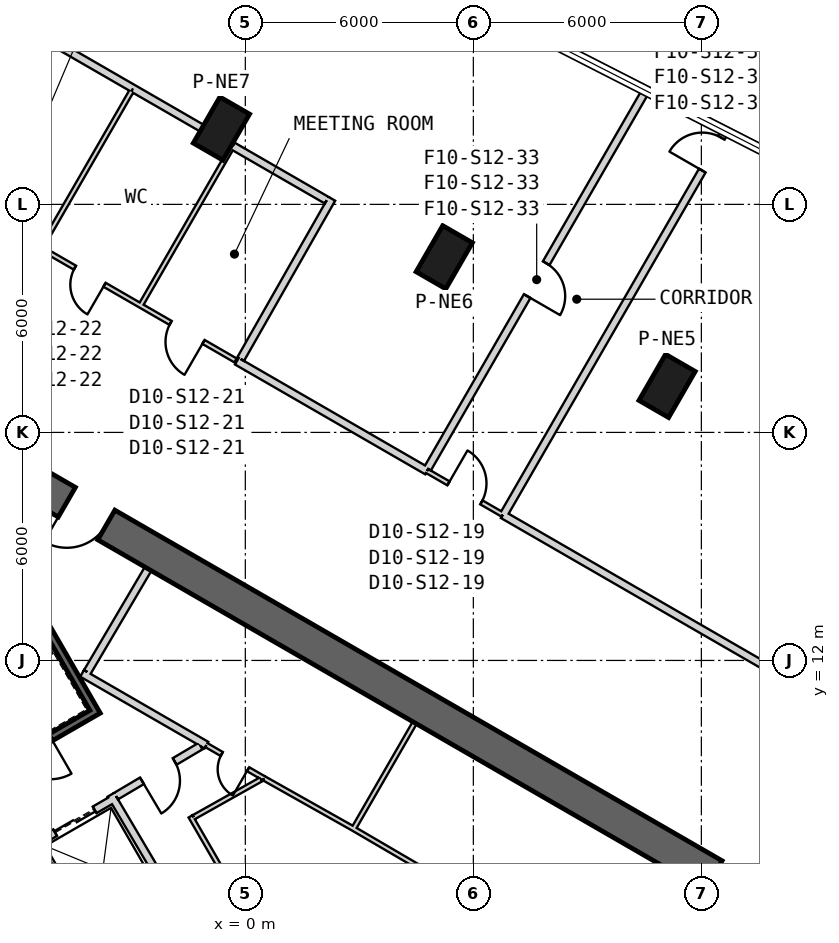
"""IFC4 building model, lengths in metres.
Left out: names, types, materials, properties, quantities, classifications, styles, units other than length and angle.
Written with IfcOpenShell. Run it as: python <this file> out.ifc"""

import sys

from ifc_helpers import new_model, si_unit, direction, frame, frame_2d, origin, origin_2d, place, context, subcontext, project, spatial, rectangle, extrude, element, fill, save


model = new_model("IFC4")
c1 = context("Model", 3, precision=1e-05, world=origin(), true_north=direction((0.0, 1.0)))
c2 = subcontext(c1, "Body", "Model", "MODEL_VIEW")
j1 = project(units=[si_unit("LENGTHUNIT", "METRE"), si_unit("PLANEANGLEUNIT", "RADIAN")], contexts=[c1])
p1 = place(None, origin())
s1 = spatial("IfcSite", under=j1, at=p1, CompositionType="ELEMENT")
p2 = place(p1, origin())
s2 = spatial("IfcBuilding", under=s1, at=p2, CompositionType="ELEMENT")
p3 = place(p2, frame((0.0, 0.0, 205.2)))
s3 = spatial("IfcBuildingStorey", under=s2, at=p3, CompositionType="ELEMENT", Elevation=205.2)
for number, where, z_axis, x_axis in (
    (1, (11.098, 19.223, 0.0), (0.0, 0.0, 1.0), (0.5, 0.866, 0.0)),
    (2, (5.235, 22.609, 0.0), (0.0, 0.0, 1.0), (0.5, 0.866, 0.0)),
    (3, (-0.629, 25.994, 0.0), (0.0, 0.0, 1.0), (0.5, 0.866, 0.0)),
):
    element("IfcColumn", number, at=place(p3, frame(where, z_axis=z_axis, x_axis=x_axis)), inside=s3, PredefinedType="COLUMN", context=c2, shape_type="SweptSolid", body=[
        extrude(rectangle(XDim=1.4, YDim=0.9, at=origin_2d()), origin(), (0.0, 0.0, 1.0), 4.0),
    ])
p4 = place(p3, frame((19.475, 2.208, 0.0), z_axis=(0.0, 0.0, 1.0), x_axis=(-0.866028369851, 0.499994862586, 0.0)))
e4 = element("IfcWall", 4, at=p4, inside=s3, PredefinedType="SHEAR", context=c2, shape_type="SweptSolid", body=[
    extrude(rectangle(XDim=31.523, YDim=0.9, at=frame_2d((15.762, 0.0))), origin(), (0.0, 0.0, 1.0), 4.0),
])
p5 = place(p4, frame((7.062, 0.0, 0.0)))
e5 = element("IfcOpeningElement", 5, at=p5, cuts=e4, PredefinedType="OPENING", context=c2, shape_type="SweptSolid", body=[
    extrude(rectangle(XDim=1.2, YDim=2.4, at=frame_2d((0.6, 1.2))), frame((0.0, 0.46, 0.0), z_axis=(0.0, -1.0, 0.0), x_axis=(1.0, 0.0, 0.0)), (0.0, 0.0, 1.0), 0.92),
])
p6 = place(p4, frame((3.612, 0.0, 0.0)))
e6 = element("IfcOpeningElement", 6, at=p6, cuts=e4, PredefinedType="OPENING", context=c2, shape_type="SweptSolid", body=[
    extrude(rectangle(XDim=1.2, YDim=2.4, at=frame_2d((0.6, 1.2))), frame((0.0, 0.46, 0.0), z_axis=(0.0, -1.0, 0.0), x_axis=(1.0, 0.0, 0.0)), (0.0, 0.0, 1.0), 0.92),
])
p7 = place(p4, frame((26.712, 0.0, 0.0)))
e7 = element("IfcOpeningElement", 7, at=p7, cuts=e4, PredefinedType="OPENING", context=c2, shape_type="SweptSolid", body=[
    extrude(rectangle(XDim=1.2, YDim=2.4, at=frame_2d((0.6, 1.2))), frame((0.0, 0.46, 0.0), z_axis=(0.0, -1.0, 0.0), x_axis=(1.0, 0.0, 0.0)), (0.0, 0.0, 1.0), 0.92),
])
p8 = place(p3, frame((-7.854, 17.405, -0.3), z_axis=(0.0, 0.0, 1.0), x_axis=(0.499997992926, -0.866026562566, 0.0)))
e8 = element("IfcWall", 8, at=p8, inside=s3, PredefinedType="SHEAR", context=c2, shape_type="SweptSolid", body=[
    extrude(rectangle(XDim=7.9, YDim=0.2, at=frame_2d((3.95, 0.0))), origin(), (0.0, 0.0, 1.0), 4.0),
])
p9 = place(p3, frame((-7.159, 8.8, -0.3), z_axis=(0.0, 0.0, 1.0), x_axis=(0.866047807691, 0.499961193289, 0.0)))
e9 = element("IfcWall", 9, at=p9, inside=s3, PredefinedType="SHEAR", context=c2, shape_type="SweptSolid", body=[
    extrude(rectangle(XDim=3.6, YDim=0.2, at=frame_2d((1.8, 0.0))), origin(), (0.0, 0.0, 1.0), 4.0),
])
p10 = place(p9, frame((1.25, 0.0, 0.3)))
e10 = element("IfcOpeningElement", 10, at=p10, cuts=e9, PredefinedType="OPENING", context=c2, shape_type="SweptSolid", body=[
    extrude(rectangle(XDim=1.1, YDim=2.1, at=frame_2d((0.55, 1.05))), frame((0.0, 0.11, 0.0), z_axis=(0.0, -1.0, 0.0), x_axis=(1.0, 0.0, 0.0)), (0.0, 0.0, 1.0), 0.22),
])
p11 = place(p3, frame((-5.524, 7.168, 0.0), z_axis=(0.0, 0.0, 1.0), x_axis=(0.866024647952, 0.500001309137, 0.0)))
e11 = element("IfcWall", 11, at=p11, inside=s3, PredefinedType="PLUMBINGWALL", context=c2, shape_type="SweptSolid", body=[
    extrude(rectangle(XDim=2.4, YDim=0.2, at=frame_2d((1.2, 0.0))), origin(), (0.0, 0.0, 1.0), 3.7),
])
p12 = place(p11, frame((0.6, 0.0, 0.0)))
e12 = element("IfcOpeningElement", 12, at=p12, cuts=e11, PredefinedType="OPENING", context=c2, shape_type="SweptSolid", body=[
    extrude(rectangle(XDim=1.2, YDim=2.4, at=frame_2d((0.6, 1.2))), frame((0.0, 0.11, 0.0), z_axis=(0.0, -1.0, 0.0), x_axis=(1.0, 0.0, 0.0)), (0.0, 0.0, 1.0), 0.22),
])
p13 = place(p3, frame((-4.039, 4.596, 0.0), z_axis=(0.0, 0.0, 1.0), x_axis=(-0.491322718731, 0.870977603649, 0.0)))
e13 = element("IfcWall", 13, at=p13, inside=s3, PredefinedType="PLUMBINGWALL", context=c2, shape_type="SweptSolid", body=[
    extrude(rectangle(XDim=3.1, YDim=0.2, at=frame_2d((1.55, 0.0))), origin(), (0.0, 0.0, 1.0), 3.7),
])
p14 = place(p3, frame((-3.538, 8.465, 0.0), z_axis=(0.0, 0.0, 1.0), x_axis=(0.508616218331, -0.860993346345, 0.0)))
e14 = element("IfcWall", 14, at=p14, inside=s3, PredefinedType="PLUMBINGWALL", context=c2, shape_type="SweptSolid", body=[
    extrude(rectangle(XDim=3.2, YDim=0.2, at=frame_2d((1.6, 0.0))), origin(), (0.0, 0.0, 1.0), 3.7),
])
p15 = place(p3, frame((4.457, 10.359, 0.0), z_axis=(0.0, 0.0, 1.0), x_axis=(-0.500017246033, -0.866015446554, 0.0)))
e15 = element("IfcWall", 15, at=p15, inside=s3, PredefinedType="PARTITIONING", context=c2, shape_type="SweptSolid", body=[
    extrude(rectangle(XDim=3.25, YDim=0.12, at=frame_2d((1.625, 0.0))), origin(), (0.0, 0.0, 1.0), 3.7),
])
p16 = place(p3, frame((7.457, 4.875, 0.0), z_axis=(0.0, 0.0, 1.0), x_axis=(-0.863262357411, 0.504755487615, 0.0)))
e16 = element("IfcWall", 16, at=p16, inside=s3, PredefinedType="PARTITIONING", context=c2, shape_type="SweptSolid", body=[
    extrude(rectangle(XDim=5.37, YDim=0.12, at=frame_2d((2.685, 0.0))), origin(), (0.0, 0.0, 1.0), 3.7),
])
p17 = place(p3, frame((-1.024, 9.771, 0.0), z_axis=(0.0, 0.0, 1.0), x_axis=(0.866039397417, -0.499975761534, 0.0)))
e17 = element("IfcWall", 17, at=p17, inside=s3, PredefinedType="PARTITIONING", context=c2, shape_type="SweptSolid", body=[
    extrude(rectangle(XDim=1.752, YDim=0.12, at=frame_2d((0.876, 0.0))), origin(), (0.0, 0.0, 1.0), 3.7),
])
p18 = place(p17, frame((0.466, 0.0, 0.0)))
e18 = element("IfcOpeningElement", 18, at=p18, cuts=e17, PredefinedType="OPENING", context=c2, shape_type="SweptSolid", body=[
    extrude(rectangle(XDim=0.8, YDim=2.1, at=frame_2d((0.4, 1.05))), frame((0.0, 0.07, 0.0), z_axis=(0.0, -1.0, 0.0), x_axis=(1.0, 0.0, 0.0)), (0.0, 0.0, 1.0), 0.14),
])
p19 = place(p3, frame((-4.296, 11.66, 0.0), z_axis=(0.0, 0.0, 1.0), x_axis=(0.866027389382, -0.499996560828, 0.0)))
e19 = element("IfcWall", 19, at=p19, inside=s3, PredefinedType="PARTITIONING", context=c2, shape_type="SweptSolid", body=[
    extrude(rectangle(XDim=3.778, YDim=0.2, at=frame_2d((1.889, 0.0))), origin(), (0.0, 0.0, 1.0), 3.7),
])
p20 = place(p3, frame((-2.558, 14.409, 0.0), z_axis=(0.0, 0.0, 1.0), x_axis=(-0.508018930956, -0.861345903683, 0.0)))
e20 = element("IfcWall", 20, at=p20, inside=s3, PredefinedType="PARTITIONING", context=c2, shape_type="SweptSolid", body=[
    extrude(rectangle(XDim=3.15, YDim=0.2, at=frame_2d((1.575, 0.0))), origin(), (0.0, 0.0, 1.0), 3.7),
])
p21 = place(p3, frame((2.821, 7.586, 0.0), z_axis=(0.0, 0.0, 1.0), x_axis=(-0.871426548871, 0.490526013503, 0.0)))
e21 = element("IfcWall", 21, at=p21, inside=s3, PredefinedType="PARTITIONING", context=c2, shape_type="SweptSolid", body=[
    extrude(rectangle(XDim=2.67, YDim=0.12, at=frame_2d((1.335, 0.0))), origin(), (0.0, 0.0, 1.0), 3.7),
])
p22 = place(p3, frame((-1.179, 9.745, 0.0), z_axis=(0.0, 0.0, 1.0), x_axis=(-0.860630814782, -0.509229418482, 0.0)))
e22 = element("IfcWall", 22, at=p22, inside=s3, PredefinedType="PARTITIONING", context=c2, shape_type="SweptSolid", body=[
    extrude(rectangle(XDim=2.582, YDim=0.2, at=frame_2d((1.291, 0.0))), origin(), (0.0, 0.0, 1.0), 3.7),
])
p23 = place(p22, frame((0.791, 0.0, 0.0)))
e23 = element("IfcOpeningElement", 23, at=p23, cuts=e22, PredefinedType="OPENING", context=c2, shape_type="SweptSolid", body=[
    extrude(rectangle(XDim=1.0, YDim=2.1, at=frame_2d((0.5, 1.05))), frame((0.0, 0.11, 0.0), z_axis=(0.0, -1.0, 0.0), x_axis=(1.0, 0.0, 0.0)), (0.0, 0.0, 1.0), 0.22),
])
p24 = place(p3, frame((-1.442, 7.897, 0.0), z_axis=(0.0, 0.0, 1.0), x_axis=(0.499990139034, -0.866031096941, 0.0)))
e24 = element("IfcWall", 24, at=p24, inside=s3, PredefinedType="PARTITIONING", context=c2, shape_type="SweptSolid", body=[
    extrude(rectangle(XDim=3.0, YDim=0.12, at=frame_2d((1.5, 0.0))), origin(), (0.0, 0.0, 1.0), 3.7),
])
p25 = place(p3, frame((0.414, 8.871, 0.0), z_axis=(0.0, 0.0, 1.0), x_axis=(-0.871809386997, -0.48984527429, 0.0)))
e25 = element("IfcWall", 25, at=p25, inside=s3, PredefinedType="PARTITIONING", context=c2, shape_type="SweptSolid", body=[
    extrude(rectangle(XDim=2.034, YDim=0.12, at=frame_2d((1.017, 0.0))), origin(), (0.0, 0.0, 1.0), 3.7),
])
p26 = place(p3, frame((4.783, 16.984, 0.0), z_axis=(0.0, 0.0, 1.0), x_axis=(0.866007057882, -0.500031774688, 0.0)))
e26 = element("IfcWall", 26, at=p26, inside=s3, PredefinedType="PARTITIONING", context=c2, shape_type="SweptSolid", body=[
    extrude(rectangle(XDim=2.3, YDim=0.12, at=frame_2d((1.15, 0.0))), origin(), (0.0, 0.0, 1.0), 3.7),
])
p27 = place(p26, frame((0.65, 0.0, 0.0)))
e27 = element("IfcOpeningElement", 27, at=p27, cuts=e26, PredefinedType="OPENING", context=c2, shape_type="SweptSolid", body=[
    extrude(rectangle(XDim=1.0, YDim=2.1, at=frame_2d((0.5, 1.05))), frame((0.0, 0.07, 0.0), z_axis=(0.0, -1.0, 0.0), x_axis=(1.0, 0.0, 0.0)), (0.0, 0.0, 1.0), 0.14),
])
p28 = place(p3, frame((23.119, 6.398, 0.0), z_axis=(0.0, 0.0, 1.0), x_axis=(-0.866027034507, 0.499997175495, 0.0)))
e28 = element("IfcWall", 28, at=p28, inside=s3, PredefinedType="PARTITIONING", context=c2, shape_type="SweptSolid", body=[
    extrude(rectangle(XDim=18.873, YDim=0.2, at=frame_2d((9.436, 0.0))), origin(), (0.0, 0.0, 1.0), 2.88),
])
p29 = place(p3, frame((4.783, 16.984, 0.0), z_axis=(0.0, 0.0, 1.0), x_axis=(-0.866032949645, 0.499986929959, 0.0)))
e29 = element("IfcWall", 29, at=p29, inside=s3, PredefinedType="PARTITIONING", context=c2, shape_type="SweptSolid", body=[
    extrude(rectangle(XDim=5.78, YDim=0.2, at=frame_2d((2.89, 0.0))), origin(), (0.0, 0.0, 1.0), 3.07),
])
p30 = place(p3, frame((-0.258, 19.894, 0.0), z_axis=(0.0, 0.0, 1.0), x_axis=(-0.866014429462, 0.500019007602, 0.0)))
e30 = element("IfcWall", 30, at=p30, inside=s3, PredefinedType="PARTITIONING", context=c2, shape_type="SweptSolid", body=[
    extrude(rectangle(XDim=5.915, YDim=0.12, at=frame_2d((2.958, 0.0))), origin(), (0.0, 0.0, 1.0), 2.88),
])
p31 = place(p30, frame((0.974, 0.0, 0.0)))
e31 = element("IfcOpeningElement", 31, at=p31, cuts=e30, PredefinedType="OPENING", context=c2, shape_type="SweptSolid", body=[
    extrude(rectangle(XDim=1.0, YDim=2.1, at=frame_2d((0.5, 1.05))), frame((0.0, 0.07, 0.0), z_axis=(0.0, -1.0, 0.0), x_axis=(1.0, 0.0, 0.0)), (0.0, 0.0, 1.0), 0.14),
])
p32 = place(p30, frame((3.981, 0.0, 0.0)))
e32 = element("IfcOpeningElement", 32, at=p32, cuts=e30, PredefinedType="OPENING", context=c2, shape_type="SweptSolid", body=[
    extrude(rectangle(XDim=0.9, YDim=2.1, at=frame_2d((0.45, 1.05))), frame((0.0, 0.07, 0.0), z_axis=(0.0, -1.0, 0.0), x_axis=(1.0, 0.0, 0.0)), (0.0, 0.0, 1.0), 0.14),
])
p33 = place(p3, frame((6.822, 15.876, 0.0), z_axis=(0.0, 0.0, 1.0), x_axis=(0.499996172356, 0.866027613664, 0.0)))
e33 = element("IfcWall", 33, at=p33, inside=s3, PredefinedType="PARTITIONING", context=c2, shape_type="SweptSolid", body=[
    extrude(rectangle(XDim=11.607, YDim=0.2, at=frame_2d((5.803, 0.0))), origin(), (0.0, 0.0, 1.0), 3.7),
])
p34 = place(p33, frame((10.407, 0.0, 0.0)))
e34 = element("IfcOpeningElement", 34, at=p34, cuts=e33, PredefinedType="OPENING", context=c2, shape_type="SweptSolid", body=[
    extrude(rectangle(XDim=1.0, YDim=2.1, at=frame_2d((0.5, 1.05))), frame((0.0, 0.11, 0.0), z_axis=(0.0, -1.0, 0.0), x_axis=(1.0, 0.0, 0.0)), (0.0, 0.0, 1.0), 0.22),
])
p35 = place(p3, frame((10.538, 26.992, 0.0), z_axis=(0.0, 0.0, 1.0), x_axis=(-0.500002753014, -0.866023814325, 0.0)))
e35 = element("IfcWall", 35, at=p35, inside=s3, PredefinedType="PARTITIONING", context=c2, shape_type="SweptSolid", body=[
    extrude(rectangle(XDim=11.485, YDim=0.2, at=frame_2d((5.743, 0.0))), origin(), (0.0, 0.0, 1.0), 3.7),
])
p36 = place(p35, frame((5.243, 0.0, 0.0)))
e36 = element("IfcOpeningElement", 36, at=p36, cuts=e35, PredefinedType="OPENING", context=c2, shape_type="SweptSolid", body=[
    extrude(rectangle(XDim=1.0, YDim=2.1, at=frame_2d((0.5, 1.05))), frame((0.0, 0.11, 0.0), z_axis=(0.0, -1.0, 0.0), x_axis=(1.0, 0.0, 0.0)), (0.0, 0.0, 1.0), 0.22),
])
p37 = place(p3, frame((2.278, 24.146, 0.0), z_axis=(0.0, 0.0, 1.0), x_axis=(-0.494609479201, -0.869115333592, 0.0)))
e37 = element("IfcWall", 37, at=p37, inside=s3, PredefinedType="PARTITIONING", context=c2, shape_type="SweptSolid", body=[
    extrude(rectangle(XDim=4.85, YDim=0.2, at=frame_2d((2.425, 0.0))), origin(), (0.0, 0.0, 1.0), 3.7),
])
p38 = place(p3, frame((-5.552, 28.551, 0.0), z_axis=(0.0, 0.0, 1.0), x_axis=(0.866040543018, -0.499973777161, 0.0)))
e38 = element("IfcWall", 38, at=p38, inside=s3, PredefinedType="PARTITIONING", context=c2, shape_type="SweptSolid", body=[
    extrude(rectangle(XDim=2.999, YDim=0.2, at=frame_2d((1.5, 0.0))), origin(), (0.0, 0.0, 1.0), 3.7),
])
p39 = place(p3, frame((-2.955, 27.052, 0.0), z_axis=(0.0, 0.0, 1.0), x_axis=(0.865996229516, -0.50005052791, 0.0)))
e39 = element("IfcWall", 39, at=p39, inside=s3, PredefinedType="PARTITIONING", context=c2, shape_type="SweptSolid", body=[
    extrude(rectangle(XDim=3.028, YDim=0.2, at=frame_2d((1.514, 0.0))), origin(), (0.0, 0.0, 1.0), 3.7),
])
p40 = place(p3, frame((-0.333, 25.538, 0.0), z_axis=(0.0, 0.0, 1.0), x_axis=(0.866063225885, -0.499934484477, 0.0)))
e40 = element("IfcWall", 40, at=p40, inside=s3, PredefinedType="PARTITIONING", context=c2, shape_type="SweptSolid", body=[
    extrude(rectangle(XDim=2.857, YDim=0.2, at=frame_2d((1.429, 0.0))), origin(), (0.0, 0.0, 1.0), 3.7),
])
p41 = place(p3, frame((-2.728, 21.39, 0.0), z_axis=(0.0, 0.0, 1.0), x_axis=(0.500007844523, 0.866020874699, 0.0)))
e41 = element("IfcWall", 41, at=p41, inside=s3, PredefinedType="PARTITIONING", context=c2, shape_type="SweptSolid", body=[
    extrude(rectangle(XDim=4.69, YDim=0.12, at=frame_2d((2.345, 0.0))), origin(), (0.0, 0.0, 1.0), 2.98),
])
p42 = place(p3, frame((-5.35, 22.903, 0.0), z_axis=(0.0, 0.0, 1.0), x_axis=(0.499985303776, 0.866033888487, 0.0)))
e42 = element("IfcWall", 42, at=p42, inside=s3, PredefinedType="PARTITIONING", context=c2, shape_type="SweptSolid", body=[
    extrude(rectangle(XDim=4.69, YDim=0.12, at=frame_2d((2.345, 0.0))), origin(), (0.0, 0.0, 1.0), 2.88),
])
p43 = place(p23, origin())
e43 = element("IfcDoor", 43, at=p43, inside=s3, OperationType="SINGLE_SWING_RIGHT", PredefinedType="USERDEFINED", context=c2, shape_type="SweptSolid", body=[
    extrude(rectangle(XDim=1.0, YDim=2.1, at=frame_2d((0.5, 1.05))), frame((0.0, 0.025, 0.0), z_axis=(0.0, -1.0, 0.0), x_axis=(1.0, 0.0, 0.0)), (0.0, 0.0, 1.0), 0.05),
])
fill(e23, e43)
p44 = place(p12, origin())
e44 = element("IfcDoor", 44, at=p44, inside=s3, OperationType="SLIDING_TO_LEFT", PredefinedType="USERDEFINED", context=c2, shape_type="SweptSolid", body=[
    extrude(rectangle(XDim=1.2, YDim=2.4, at=frame_2d((0.6, 1.2))), frame((0.0, 0.025, 0.0), z_axis=(0.0, -1.0, 0.0), x_axis=(1.0, 0.0, 0.0)), (0.0, 0.0, 1.0), 0.05),
])
fill(e12, e44)
p45 = place(p18, origin())
e45 = element("IfcDoor", 45, at=p45, inside=s3, OperationType="SINGLE_SWING_RIGHT", PredefinedType="USERDEFINED", context=c2, shape_type="SweptSolid", body=[
    extrude(rectangle(XDim=0.8, YDim=2.1, at=frame_2d((0.4, 1.05))), frame((0.0, 0.025, 0.0), z_axis=(0.0, -1.0, 0.0), x_axis=(1.0, 0.0, 0.0)), (0.0, 0.0, 1.0), 0.05),
])
fill(e18, e45)
p46 = place(p27, origin())
e46 = element("IfcDoor", 46, at=p46, inside=s3, OperationType="SINGLE_SWING_LEFT", PredefinedType="NOTDEFINED", context=c2, shape_type="SweptSolid", body=[
    extrude(rectangle(XDim=1.0, YDim=2.1, at=frame_2d((0.5, 1.05))), frame((0.0, 0.025, 0.0), z_axis=(0.0, -1.0, 0.0), x_axis=(1.0, 0.0, 0.0)), (0.0, 0.0, 1.0), 0.05),
])
fill(e27, e46)
p47 = place(p31, origin())
e47 = element("IfcDoor", 47, at=p47, inside=s3, OperationType="SINGLE_SWING_LEFT", PredefinedType="NOTDEFINED", context=c2, shape_type="SweptSolid", body=[
    extrude(rectangle(XDim=1.0, YDim=2.1, at=frame_2d((0.5, 1.05))), frame((0.0, 0.025, 0.0), z_axis=(0.0, -1.0, 0.0), x_axis=(1.0, 0.0, 0.0)), (0.0, 0.0, 1.0), 0.05),
])
fill(e31, e47)
p48 = place(p32, origin())
e48 = element("IfcDoor", 48, at=p48, inside=s3, OperationType="SINGLE_SWING_LEFT", PredefinedType="NOTDEFINED", context=c2, shape_type="SweptSolid", body=[
    extrude(rectangle(XDim=0.9, YDim=2.1, at=frame_2d((0.45, 1.05))), frame((0.0, 0.025, 0.0), z_axis=(0.0, -1.0, 0.0), x_axis=(1.0, 0.0, 0.0)), (0.0, 0.0, 1.0), 0.05),
])
fill(e32, e48)
p49 = place(p34, origin())
e49 = element("IfcDoor", 49, at=p49, inside=s3, OperationType="SINGLE_SWING_LEFT", PredefinedType="USERDEFINED", context=c2, shape_type="SweptSolid", body=[
    extrude(rectangle(XDim=1.0, YDim=2.1, at=frame_2d((0.5, 1.05))), frame((0.0, 0.025, 0.0), z_axis=(0.0, -1.0, 0.0), x_axis=(1.0, 0.0, 0.0)), (0.0, 0.0, 1.0), 0.05),
])
fill(e34, e49)
p50 = place(p36, origin())
e50 = element("IfcDoor", 50, at=p50, inside=s3, OperationType="SINGLE_SWING_LEFT", PredefinedType="USERDEFINED", context=c2, shape_type="SweptSolid", body=[
    extrude(rectangle(XDim=1.0, YDim=2.1, at=frame_2d((0.5, 1.05))), frame((0.0, 0.025, 0.0), z_axis=(0.0, -1.0, 0.0), x_axis=(1.0, 0.0, 0.0)), (0.0, 0.0, 1.0), 0.05),
])
fill(e36, e50)
p51 = place(p7, origin())
e51 = element("IfcDoor", 51, at=p51, inside=s3, OperationType="SINGLE_SWING_RIGHT", PredefinedType="USERDEFINED", context=c2, shape_type="SweptSolid", body=[
    extrude(rectangle(XDim=1.2, YDim=2.4, at=frame_2d((0.6, 1.2))), frame((0.0, 0.025, 0.0), z_axis=(0.0, -1.0, 0.0), x_axis=(1.0, 0.0, 0.0)), (0.0, 0.0, 1.0), 0.05),
])
fill(e7, e51)
save(model, sys.argv[1])
